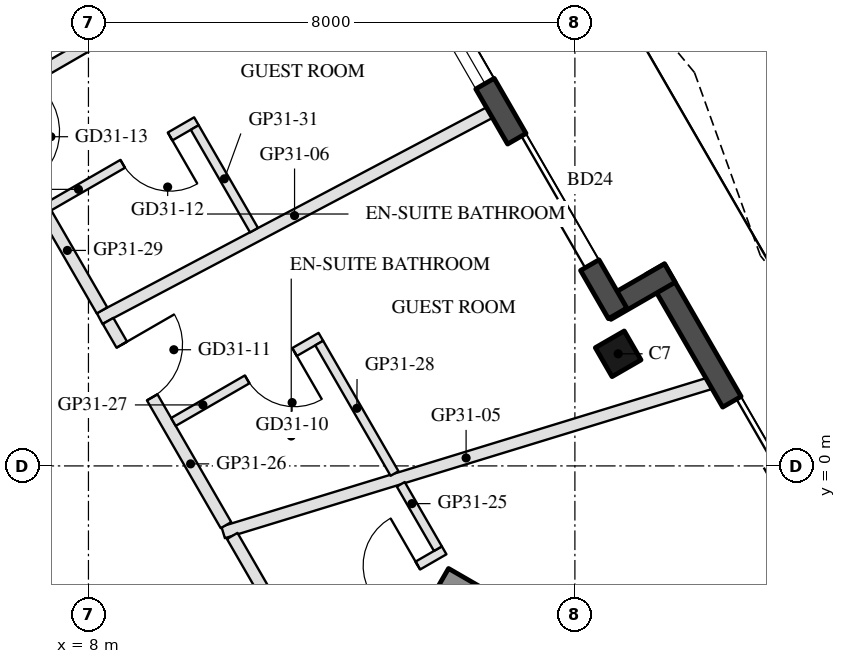
"""IFC4 building model, lengths in metres.
Left out: names, types, materials, properties, quantities, classifications, styles, units other than length and angle.
Written with IfcOpenShell. Run it as: python <this file> out.ifc"""

import sys

from ifc_helpers import new_model, si_unit, direction, frame, frame_2d, origin, origin_2d, place, context, subcontext, project, spatial, rectangle, hollow_rectangle, extrude, boolean, halfspace, element, fill, save


model = new_model("IFC4")
c1 = context("Model", 3, precision=1e-05, world=origin(), true_north=direction((0.0, 1.0)))
c2 = subcontext(c1, "Body", "Model", "MODEL_VIEW")
j1 = project(units=[si_unit("LENGTHUNIT", "METRE"), si_unit("PLANEANGLEUNIT", "RADIAN")], contexts=[c1])
p1 = place(None, origin())
s1 = spatial("IfcSite", under=j1, at=p1, CompositionType="ELEMENT")
p2 = place(p1, origin())
s2 = spatial("IfcBuilding", under=s1, at=p2, CompositionType="ELEMENT")
p3 = place(p2, frame((0.0, 0.0, 302.2)))
s3 = spatial("IfcBuildingStorey", under=s2, at=p3, CompositionType="ELEMENT", Elevation=302.2)
p4 = place(p3, frame((16.711, 1.844, 0.0), z_axis=(0.0, 0.0, 1.0), x_axis=(-0.5, 0.866025403784, 0.0)))
e1 = element("IfcColumn", 1, at=p4, inside=s3, PredefinedType="COLUMN", context=c2, shape_type="SweptSolid", body=[
    boolean("DIFFERENCE", extrude(hollow_rectangle(XDim=0.55, YDim=0.55, WallThickness=0.025, at=origin_2d()), origin(), (0.0, 0.0, 1.0), 3.7), halfspace(frame((0.0, 0.0, 0.034), z_axis=(0.0, 0.0, 1.0), x_axis=(1.0, 0.0, 0.0)), True)),
])
p5 = place(p3, frame((22.442, -5.632, 0.0), z_axis=(0.0, 0.0, 1.0), x_axis=(-0.499983205548, 0.866035099848, 0.0)))
e2 = element("IfcWall", 2, at=p5, inside=s3, PredefinedType="SOLIDWALL", context=c2, shape_type="SweptSolid", body=[
    extrude(rectangle(XDim=10.239, YDim=0.35, at=frame_2d((5.12, 0.0))), origin(), (0.0, 0.0, 1.0), 3.55),
])
p6 = place(p5, frame((5.32, 0.0, 0.0)))
e3 = element("IfcOpeningElement", 3, at=p6, cuts=e2, PredefinedType="OPENING", context=c2, shape_type="SweptSolid", body=[
    extrude(rectangle(XDim=2.4, YDim=2.4, at=frame_2d((1.2, 1.2))), frame((0.0, 0.185, 0.0), z_axis=(0.0, -1.0, 0.0), x_axis=(1.0, 0.0, 0.0)), (0.0, 0.0, 1.0), 0.37),
])
p7 = place(p5, frame((3.205, 0.0, 0.3)))
e4 = element("IfcOpeningElement", 4, at=p7, cuts=e2, PredefinedType="OPENING", context=c2, shape_type="SweptSolid", body=[
    extrude(rectangle(XDim=1.8, YDim=2.65, at=frame_2d((0.9, 1.325))), frame((0.0, 0.185, 0.0), z_axis=(0.0, -1.0, 0.0), x_axis=(1.0, 0.0, 0.0)), (0.0, 0.0, 1.0), 0.37),
])
p8 = place(p3, frame((17.562, 3.172, 0.0), z_axis=(0.0, 0.0, 1.0), x_axis=(-0.866005645448, -0.500034220881, 0.0)))
e5 = element("IfcWall", 5, at=p8, inside=s3, PredefinedType="SOLIDWALL", context=c2, shape_type="SweptSolid", body=[
    extrude(rectangle(XDim=1.22, YDim=0.35, at=frame_2d((0.61, 0.0))), origin(), (0.0, 0.0, 1.0), 3.55),
])
p9 = place(p3, frame((16.703, 2.509, 0.0), z_axis=(0.0, 0.0, 1.0), x_axis=(-0.499975351079, 0.866039634378, 0.0)))
e6 = element("IfcWall", 6, at=p9, inside=s3, PredefinedType="SOLIDWALL", context=c2, shape_type="SweptSolid", body=[
    extrude(rectangle(XDim=5.599, YDim=0.35, at=frame_2d((2.799, 0.0))), origin(), (0.0, 0.0, 1.0), 3.55),
])
p10 = place(p9, frame((0.917, 0.0, 0.0)))
e7 = element("IfcOpeningElement", 7, at=p10, cuts=e6, PredefinedType="OPENING", context=c2, shape_type="SweptSolid", body=[
    extrude(rectangle(XDim=2.4, YDim=2.4, at=frame_2d((1.2, 1.2))), frame((0.0, 0.185, 0.0), z_axis=(0.0, -1.0, 0.0), x_axis=(1.0, 0.0, 0.0)), (0.0, 0.0, 1.0), 0.37),
])
p11 = place(p9, frame((4.363, 0.0, 0.3)))
e8 = element("IfcOpeningElement", 8, at=p11, cuts=e6, PredefinedType="OPENING", context=c2, shape_type="SweptSolid", body=[
    extrude(rectangle(XDim=0.9, YDim=2.65, at=frame_2d((0.45, 1.325))), frame((0.0, 0.185, 0.0), z_axis=(0.0, -1.0, 0.0), x_axis=(1.0, 0.0, 0.0)), (0.0, 0.0, 1.0), 0.37),
])
p12 = place(p3, frame((13.797, -1.903, 0.0), z_axis=(0.0, 0.0, 1.0), x_axis=(0.866027279078, -0.499996751883, 0.0)))
e9 = element("IfcWall", 9, at=p12, inside=s3, PredefinedType="SHEAR", context=c2, shape_type="SweptSolid", body=[
    extrude(rectangle(XDim=10.298, YDim=0.5, at=frame_2d((5.149, 0.0))), origin(), (0.0, 0.0, 1.0), 3.5),
])
p13 = place(p3, frame((18.206, 1.355, 0.0), z_axis=(0.0, 0.0, 1.0), x_axis=(-0.956150885444, -0.292874519658, 0.0)))
e10 = element("IfcWall", 10, at=p13, inside=s3, PredefinedType="PARTITIONING", context=c2, shape_type="SweptSolid", body=[
    extrude(rectangle(XDim=8.358, YDim=0.2, at=frame_2d((4.179, 0.0))), origin(), (0.0, 0.0, 1.0), 3.1),
])
p14 = place(p3, frame((14.595, 5.81, 0.0), z_axis=(0.0, 0.0, 1.0), x_axis=(-0.884286267242, -0.46694517619, 0.0)))
e11 = element("IfcWall", 11, at=p14, inside=s3, PredefinedType="PARTITIONING", context=c2, shape_type="SweptSolid", body=[
    extrude(rectangle(XDim=7.25, YDim=0.2, at=frame_2d((3.625, 0.0))), origin(), (0.0, 0.0, 1.0), 3.16),
])
p15 = place(p3, frame((13.241, 9.954, 0.0), z_axis=(0.0, 0.0, 1.0), x_axis=(-0.866028345359, -0.499994905008, 0.0)))
e12 = element("IfcWall", 12, at=p15, inside=s3, PredefinedType="PARTITIONING", context=c2, shape_type="SweptSolid", body=[
    extrude(rectangle(XDim=8.145, YDim=0.2, at=frame_2d((4.072, 0.0))), origin(), (0.0, 0.0, 1.0), 3.16),
])
p16 = place(p3, frame((10.365, -1.152, 0.0), z_axis=(0.0, 0.0, 1.0), x_axis=(0.499999897272, -0.866025463095, 0.0)))
e13 = element("IfcWall", 13, at=p16, inside=s3, PredefinedType="PARTITIONING", context=c2, shape_type="SweptSolid", body=[
    extrude(rectangle(XDim=3.809, YDim=0.2, at=frame_2d((1.904, 0.0))), origin(), (0.0, 0.0, 1.0), 3.1),
])
p17 = place(p16, frame((2.409, 0.0, 0.0)))
e14 = element("IfcOpeningElement", 14, at=p17, cuts=e13, PredefinedType="OPENING", context=c2, shape_type="SweptSolid", body=[
    extrude(rectangle(XDim=1.0, YDim=2.1, at=frame_2d((0.5, 1.05))), frame((0.0, 0.11, 0.0), z_axis=(0.0, -1.0, 0.0), x_axis=(1.0, 0.0, 0.0)), (0.0, 0.0, 1.0), 0.22),
])
p18 = place(p3, frame((11.425, -2.789, 0.0), z_axis=(0.0, 0.0, 1.0), x_axis=(0.865996816683, 0.500049511043, 0.0)))
e15 = element("IfcWall", 15, at=p18, inside=s3, PredefinedType="PARTITIONING", context=c2, shape_type="SweptSolid", body=[
    extrude(rectangle(XDim=2.8, YDim=0.15, at=frame_2d((1.4, 0.0))), origin(), (0.0, 0.0, 1.0), 3.55),
])
p19 = place(p18, frame((1.4, 0.0, 0.0)))
e16 = element("IfcOpeningElement", 16, at=p19, cuts=e15, PredefinedType="OPENING", context=c2, shape_type="SweptSolid", body=[
    extrude(rectangle(XDim=0.9, YDim=2.1, at=frame_2d((0.45, 1.05))), frame((0.0, 0.085, 0.0), z_axis=(0.0, -1.0, 0.0), x_axis=(1.0, 0.0, 0.0)), (0.0, 0.0, 1.0), 0.17),
])
p20 = place(p3, frame((13.747, -1.361, 0.0), z_axis=(0.0, 0.0, 1.0), x_axis=(-0.499941460885, 0.86605919872, 0.0)))
e17 = element("IfcWall", 17, at=p20, inside=s3, PredefinedType="PARTITIONING", context=c2, shape_type="SweptSolid", body=[
    extrude(rectangle(XDim=1.222, YDim=0.15, at=frame_2d((0.611, 0.0))), origin(), (0.0, 0.0, 1.0), 3.1),
])
p21 = place(p3, frame((8.323, 2.385, 0.0), z_axis=(0.0, 0.0, 1.0), x_axis=(0.499998569178, -0.866026229868, 0.0)))
e18 = element("IfcWall", 18, at=p21, inside=s3, PredefinedType="PARTITIONING", context=c2, shape_type="SweptSolid", body=[
    extrude(rectangle(XDim=3.878, YDim=0.2, at=frame_2d((1.939, 0.0))), origin(), (0.0, 0.0, 1.0), 3.1),
])
p22 = place(p21, frame((0.451, 0.0, 0.0)))
e19 = element("IfcOpeningElement", 19, at=p22, cuts=e18, PredefinedType="OPENING", context=c2, shape_type="SweptSolid", body=[
    extrude(rectangle(XDim=1.0, YDim=2.1, at=frame_2d((0.5, 1.05))), frame((0.0, 0.11, 0.0), z_axis=(0.0, -1.0, 0.0), x_axis=(1.0, 0.0, 0.0)), (0.0, 0.0, 1.0), 0.22),
])
p23 = place(p3, frame((11.822, 2.123, 0.0), z_axis=(0.0, 0.0, 1.0), x_axis=(-0.865996816683, -0.500049511043, 0.0)))
e20 = element("IfcWall", 20, at=p23, inside=s3, PredefinedType="PARTITIONING", context=c2, shape_type="SweptSolid", body=[
    extrude(rectangle(XDim=2.8, YDim=0.15, at=frame_2d((1.4, 0.0))), origin(), (0.0, 0.0, 1.0), 3.55),
])
p24 = place(p23, frame((0.5, 0.0, 0.0)))
e21 = element("IfcOpeningElement", 21, at=p24, cuts=e20, PredefinedType="OPENING", context=c2, shape_type="SweptSolid", body=[
    extrude(rectangle(XDim=0.9, YDim=2.1, at=frame_2d((0.45, 1.05))), frame((0.0, 0.085, 0.0), z_axis=(0.0, -1.0, 0.0), x_axis=(1.0, 0.0, 0.0)), (0.0, 0.0, 1.0), 0.17),
])
p25 = place(p3, frame((13.034, -0.125, 0.0), z_axis=(0.0, 0.0, 1.0), x_axis=(-0.499975499923, 0.866039548448, 0.0)))
e22 = element("IfcWall", 22, at=p25, inside=s3, PredefinedType="PARTITIONING", context=c2, shape_type="SweptSolid", body=[
    extrude(rectangle(XDim=2.478, YDim=0.15, at=frame_2d((1.239, 0.0))), origin(), (0.0, 0.0, 1.0), 3.55),
])
p26 = place(p3, frame((6.325, 5.845, 0.0), z_axis=(0.0, 0.0, 1.0), x_axis=(0.499971120268, -0.866042076863, 0.0)))
e23 = element("IfcWall", 23, at=p26, inside=s3, PredefinedType="PARTITIONING", context=c2, shape_type="SweptSolid", body=[
    extrude(rectangle(XDim=3.796, YDim=0.2, at=frame_2d((1.898, 0.0))), origin(), (0.0, 0.0, 1.0), 3.1),
])
p27 = place(p26, frame((0.402, 0.0, 0.0)))
e24 = element("IfcOpeningElement", 24, at=p27, cuts=e23, PredefinedType="OPENING", context=c2, shape_type="SweptSolid", body=[
    extrude(rectangle(XDim=1.0, YDim=2.1, at=frame_2d((0.5, 1.05))), frame((0.0, 0.11, 0.0), z_axis=(0.0, -1.0, 0.0), x_axis=(1.0, 0.0, 0.0)), (0.0, 0.0, 1.0), 0.22),
])
p28 = place(p3, frame((9.775, 5.668, 0.0), z_axis=(0.0, 0.0, 1.0), x_axis=(-0.865996816683, -0.500049511043, 0.0)))
e25 = element("IfcWall", 25, at=p28, inside=s3, PredefinedType="PARTITIONING", context=c2, shape_type="SweptSolid", body=[
    extrude(rectangle(XDim=2.8, YDim=0.15, at=frame_2d((1.4, 0.0))), origin(), (0.0, 0.0, 1.0), 3.1),
])
p29 = place(p28, frame((0.5, 0.0, 0.0)))
e26 = element("IfcOpeningElement", 26, at=p29, cuts=e25, PredefinedType="OPENING", context=c2, shape_type="SweptSolid", body=[
    extrude(rectangle(XDim=0.9, YDim=2.1, at=frame_2d((0.45, 1.05))), frame((0.0, 0.085, 0.0), z_axis=(0.0, -1.0, 0.0), x_axis=(1.0, 0.0, 0.0)), (0.0, 0.0, 1.0), 0.17),
])
p30 = place(p3, frame((10.722, 3.878, 0.0), z_axis=(0.0, 0.0, 1.0), x_axis=(-0.49992486272, 0.866068779967, 0.0)))
e27 = element("IfcWall", 27, at=p30, inside=s3, PredefinedType="PARTITIONING", context=c2, shape_type="SweptSolid", body=[
    extrude(rectangle(XDim=1.949, YDim=0.15, at=frame_2d((0.975, 0.0))), origin(), (0.0, 0.0, 1.0), 3.1),
])
p31 = place(p6, frame((2.4, 0.0, 0.0), z_axis=(0.0, 0.0, 1.0), x_axis=(-1.0, 0.0, 0.0)))
e28 = element("IfcDoor", 28, at=p31, inside=s3, OperationType="SLIDING_TO_LEFT", PredefinedType="DOOR", context=c2, shape_type="SweptSolid", body=[
    extrude(rectangle(XDim=2.4, YDim=2.4, at=frame_2d((1.2, 1.2))), frame((0.0, 0.025, 0.0), z_axis=(0.0, -1.0, 0.0), x_axis=(1.0, 0.0, 0.0)), (0.0, 0.0, 1.0), 0.05),
])
fill(e3, e28)
p32 = place(p10, frame((2.4, 0.0, 0.0), z_axis=(0.0, 0.0, 1.0), x_axis=(-1.0, 0.0, 0.0)))
e29 = element("IfcDoor", 29, at=p32, inside=s3, OperationType="SLIDING_TO_LEFT", PredefinedType="DOOR", context=c2, shape_type="SweptSolid", body=[
    extrude(rectangle(XDim=2.4, YDim=2.4, at=frame_2d((1.2, 1.2))), frame((0.0, 0.025, 0.0), z_axis=(0.0, -1.0, 0.0), x_axis=(1.0, 0.0, 0.0)), (0.0, 0.0, 1.0), 0.05),
])
fill(e7, e29)
p33 = place(p11, origin())
e30 = element("IfcWindow", 30, at=p33, inside=s3, PartitioningType="SINGLE_PANEL", PredefinedType="WINDOW", context=c2, shape_type="SweptSolid", body=[
    extrude(rectangle(XDim=0.9, YDim=2.65, at=frame_2d((0.45, 1.325))), frame((0.0, 0.03, 0.0), z_axis=(0.0, -1.0, 0.0), x_axis=(1.0, 0.0, 0.0)), (0.0, 0.0, 1.0), 0.06),
])
fill(e8, e30)
p34 = place(p19, origin())
e31 = element("IfcDoor", 31, at=p34, inside=s3, OperationType="SINGLE_SWING_RIGHT", PredefinedType="DOOR", context=c2, shape_type="SweptSolid", body=[
    extrude(rectangle(XDim=0.9, YDim=2.1, at=frame_2d((0.45, 1.05))), frame((0.0, 0.025, 0.0), z_axis=(0.0, -1.0, 0.0), x_axis=(1.0, 0.0, 0.0)), (0.0, 0.0, 1.0), 0.05),
])
fill(e16, e31)
p35 = place(p24, origin())
e32 = element("IfcDoor", 32, at=p35, inside=s3, OperationType="SINGLE_SWING_LEFT", PredefinedType="DOOR", context=c2, shape_type="SweptSolid", body=[
    extrude(rectangle(XDim=0.9, YDim=2.1, at=frame_2d((0.45, 1.05))), frame((0.0, 0.025, 0.0), z_axis=(0.0, -1.0, 0.0), x_axis=(1.0, 0.0, 0.0)), (0.0, 0.0, 1.0), 0.05),
])
fill(e21, e32)
p36 = place(p22, origin())
e33 = element("IfcDoor", 33, at=p36, inside=s3, OperationType="SINGLE_SWING_LEFT", PredefinedType="DOOR", context=c2, shape_type="SweptSolid", body=[
    extrude(rectangle(XDim=1.0, YDim=2.1, at=frame_2d((0.5, 1.05))), frame((0.0, 0.025, 0.0), z_axis=(0.0, -1.0, 0.0), x_axis=(1.0, 0.0, 0.0)), (0.0, 0.0, 1.0), 0.05),
])
fill(e19, e33)
p37 = place(p29, origin())
e34 = element("IfcDoor", 34, at=p37, inside=s3, OperationType="SINGLE_SWING_LEFT", PredefinedType="DOOR", context=c2, shape_type="SweptSolid", body=[
    extrude(rectangle(XDim=0.9, YDim=2.1, at=frame_2d((0.45, 1.05))), frame((0.0, 0.025, 0.0), z_axis=(0.0, -1.0, 0.0), x_axis=(1.0, 0.0, 0.0)), (0.0, 0.0, 1.0), 0.05),
])
fill(e26, e34)
save(model, sys.argv[1])
